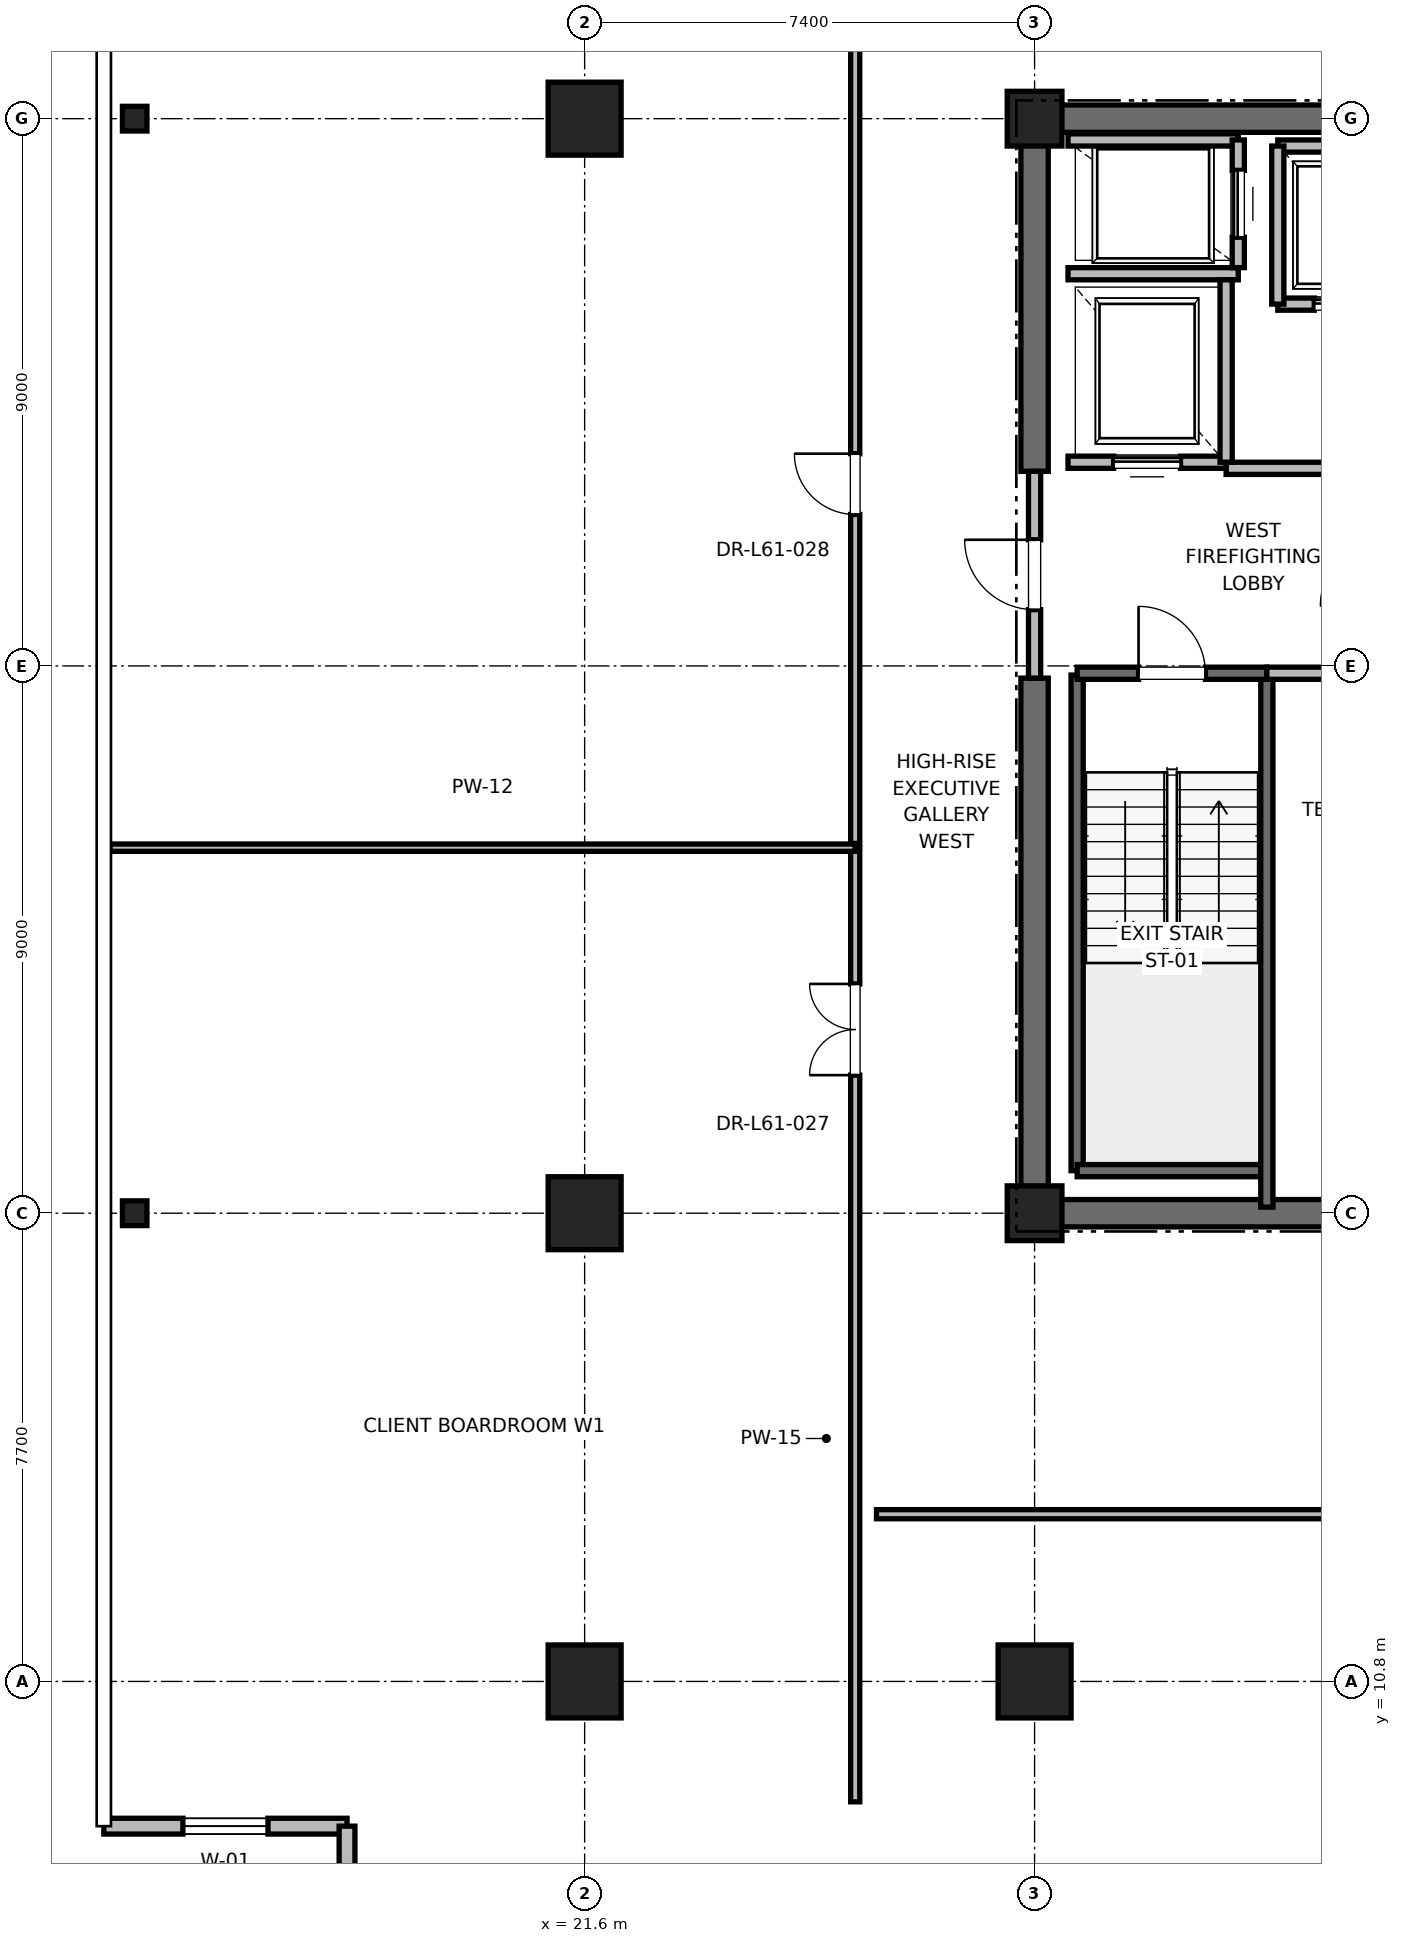
"""IFC4 building model, lengths in metres.
Left out: names, types, materials, properties, quantities, classifications, styles, units other than length and angle.
Written with IfcOpenShell. Run it as: python <this file> out.ifc"""

import sys

from ifc_helpers import new_model, si_unit, direction, frame, frame_2d, origin, origin_2d, place, context, subcontext, project, spatial, rectangle, i_section, extrude, element, fill, save


model = new_model("IFC4")
c1 = context("Model", 3, precision=1e-05, world=origin(), true_north=direction((0.0, 1.0)))
c2 = subcontext(c1, "Body", "Model", "MODEL_VIEW")
j1 = project(units=[si_unit("LENGTHUNIT", "METRE"), si_unit("PLANEANGLEUNIT", "RADIAN")], contexts=[c1])
p1 = place(None, origin())
s1 = spatial("IfcSite", under=j1, at=p1, CompositionType="ELEMENT")
p2 = place(p1, origin())
s2 = spatial("IfcBuilding", under=s1, at=p2, CompositionType="ELEMENT")
p3 = place(p2, frame((0.0, 0.0, 263.2)))
s3 = spatial("IfcBuildingStorey", under=s2, at=p3, CompositionType="ELEMENT", Elevation=263.2)
for number, where, z_axis, x_axis in (
    (1, (29.0, 10.8, 0.0), (0.0, 0.0, 1.0), (1.0, 0.0, 0.0)),
    (2, (21.6, 18.5, 0.0), (0.0, 0.0, 1.0), (1.0, 0.0, 0.0)),
    (3, (21.6, 36.5, 0.0), (0.0, 0.0, 1.0), (1.0, 0.0, 0.0)),
    (4, (21.6, 10.8, 0.0), (0.0, 0.0, 1.0), (1.0, 0.0, 0.0)),
):
    element("IfcColumn", number, at=place(p3, frame(where, z_axis=z_axis, x_axis=x_axis)), inside=s3, PredefinedType="COLUMN", context=c2, shape_type="SweptSolid", body=[
        extrude(rectangle(XDim=1.2, YDim=1.2, at=origin_2d()), origin(), (0.0, 0.0, 1.0), 4.0),
    ])
for number, where, z_axis, x_axis in (
    (5, (14.2, 18.5, 0.0), (0.0, 0.0, 1.0), (1.0, 0.0, 0.0)),
    (6, (14.2, 36.5, 0.0), (0.0, 0.0, 1.0), (1.0, 0.0, 0.0)),
):
    element("IfcColumn", number, at=place(p3, frame(where, z_axis=z_axis, x_axis=x_axis)), inside=s3, PredefinedType="COLUMN", context=c2, shape_type="SweptSolid", body=[
        extrude(i_section(OverallWidth=0.403, OverallDepth=0.406, WebThickness=0.027, FlangeThickness=0.043, FilletRadius=0.015, at=origin_2d()), origin(), (0.0, 0.0, 1.0), 4.0),
    ])
for number, where, z_axis, x_axis in (
    (7, (29.0, 18.5, 0.0), (0.0, 0.0, 1.0), (1.0, 0.0, 0.0)),
    (8, (29.0, 36.5, 0.0), (0.0, 0.0, 1.0), (1.0, 0.0, 0.0)),
):
    element("IfcColumn", number, at=place(p3, frame(where, z_axis=z_axis, x_axis=x_axis)), inside=s3, PredefinedType="PILASTER", context=c2, shape_type="SweptSolid", body=[
        extrude(rectangle(XDim=0.9, YDim=0.9, at=origin_2d()), origin(), (0.0, 0.0, 1.0), 4.0),
    ])
p4 = place(p3, frame((29.0, 18.5, 0.0), z_axis=(0.0, 0.0, 1.0), x_axis=(1.0, 0.0, 0.0)))
e9 = element("IfcWall", 9, at=p4, inside=s3, PredefinedType="SHEAR", context=c2, shape_type="SweptSolid", body=[
    extrude(rectangle(XDim=9.2, YDim=0.45, at=frame_2d((4.6, 0.0))), origin(), (0.0, 0.0, 1.0), 3.785),
])
p5 = place(p3, frame((29.0, 36.5, 0.0), z_axis=(0.0, 0.0, 1.0), x_axis=(1.0, 0.0, 0.0)))
e10 = element("IfcWall", 10, at=p5, inside=s3, PredefinedType="SHEAR", context=c2, shape_type="SweptSolid", body=[
    extrude(rectangle(XDim=5.8, YDim=0.45, at=frame_2d((2.9, 0.0))), origin(), (0.0, 0.0, 1.0), 3.785),
])
p6 = place(p3, frame((29.0, 18.5, 0.0), z_axis=(0.0, 0.0, 1.0), x_axis=(0.0, 1.0, 0.0)))
e11 = element("IfcWall", 11, at=p6, inside=s3, PredefinedType="SHEAR", context=c2, shape_type="SweptSolid", body=[
    extrude(rectangle(XDim=8.8, YDim=0.45, at=frame_2d((4.4, 0.0))), origin(), (0.0, 0.0, 1.0), 3.785),
])
p7 = place(p3, frame((29.0, 30.7, 0.0), z_axis=(0.0, 0.0, 1.0), x_axis=(0.0, 1.0, 0.0)))
e12 = element("IfcWall", 12, at=p7, inside=s3, PredefinedType="SHEAR", context=c2, shape_type="SweptSolid", body=[
    extrude(rectangle(XDim=5.8, YDim=0.45, at=frame_2d((2.9, 0.0))), origin(), (0.0, 0.0, 1.0), 3.785),
])
p8 = place(p3, frame((13.692, 8.42, 0.0), z_axis=(0.0, 0.0, 1.0), x_axis=(1.0, 0.0, 0.0)))
e13 = element("IfcWall", 13, at=p8, inside=s3, PredefinedType="PARAPET", context=c2, shape_type="SweptSolid", body=[
    extrude(rectangle(XDim=4.0, YDim=0.26, at=frame_2d((2.0, 0.0))), origin(), (0.0, 0.0, 1.0), 3.785),
])
p9 = place(p8, frame((1.3, 0.0, 0.85)))
e14 = element("IfcOpeningElement", 14, at=p9, cuts=e13, PredefinedType="OPENING", context=c2, shape_type="SweptSolid", body=[
    extrude(rectangle(XDim=1.4, YDim=2.0, at=frame_2d((0.7, 1.0))), frame((0.0, 0.13, 0.0), z_axis=(0.0, -1.0, 0.0), x_axis=(1.0, 0.0, 0.0)), (0.0, 0.0, 1.0), 0.26),
])
p10 = place(p3, frame((17.692, 8.42, 0.0), z_axis=(0.0, 0.0, 1.0), x_axis=(0.0, -1.0, 0.0)))
e15 = element("IfcWall", 15, at=p10, inside=s3, PredefinedType="PARAPET", context=c2, shape_type="SweptSolid", body=[
    extrude(rectangle(XDim=3.5, YDim=0.26, at=frame_2d((1.75, 0.0))), origin(), (0.0, 0.0, 1.0), 3.785),
])
p11 = place(p3, frame((29.7, 19.2, 0.0), z_axis=(0.0, 0.0, 1.0), x_axis=(0.0, 1.0, 0.0)))
e16 = element("IfcWall", 16, at=p11, inside=s3, PredefinedType="SOLIDWALL", context=c2, shape_type="SweptSolid", body=[
    extrude(rectangle(XDim=8.15, YDim=0.2, at=frame_2d((4.075, 0.0))), origin(), (0.0, 0.0, 1.0), 3.785),
])
p12 = place(p3, frame((29.7, 19.2, 0.0), z_axis=(0.0, 0.0, 1.0), x_axis=(1.0, 0.0, 0.0)))
e17 = element("IfcWall", 17, at=p12, inside=s3, PredefinedType="SOLIDWALL", context=c2, shape_type="SweptSolid", body=[
    extrude(rectangle(XDim=3.12, YDim=0.2, at=frame_2d((1.56, 0.0))), origin(), (0.0, 0.0, 1.0), 3.785),
])
p13 = place(p3, frame((32.82, 18.6, 0.0), z_axis=(0.0, 0.0, 1.0), x_axis=(0.0, 1.0, 0.0)))
e18 = element("IfcWall", 18, at=p13, inside=s3, PredefinedType="SOLIDWALL", context=c2, shape_type="SweptSolid", body=[
    extrude(rectangle(XDim=8.78, YDim=0.2, at=frame_2d((4.39, 0.0))), origin(), (0.0, 0.0, 1.0), 3.785),
])
p14 = place(p3, frame((29.7, 27.38, 0.0), z_axis=(0.0, 0.0, 1.0), x_axis=(1.0, 0.0, 0.0)))
e19 = element("IfcWall", 19, at=p14, inside=s3, PredefinedType="SOLIDWALL", context=c2, shape_type="SweptSolid", body=[
    extrude(rectangle(XDim=3.12, YDim=0.2, at=frame_2d((1.56, 0.0))), origin(), (0.0, 0.0, 1.0), 3.785),
])
p15 = place(p14, frame((1.01, 0.0, 0.0)))
e20 = element("IfcOpeningElement", 20, at=p15, cuts=e19, PredefinedType="OPENING", context=c2, shape_type="SweptSolid", body=[
    extrude(rectangle(XDim=1.1, YDim=2.15, at=frame_2d((0.55, 1.075))), frame((0.0, 0.1, 0.0), z_axis=(0.0, -1.0, 0.0), x_axis=(1.0, 0.0, 0.0)), (0.0, 0.0, 1.0), 0.2),
])
p16 = place(p3, frame((29.0, 27.3, 0.0), z_axis=(0.0, 0.0, 1.0), x_axis=(0.0, 1.0, 0.0)))
e21 = element("IfcWall", 21, at=p16, inside=s3, PredefinedType="PARTITIONING", context=c2, shape_type="SweptSolid", body=[
    extrude(rectangle(XDim=3.4, YDim=0.2, at=frame_2d((1.7, 0.0))), origin(), (0.0, 0.0, 1.0), 2.865),
])
p17 = place(p16, frame((1.125, 0.0, 0.0)))
e22 = element("IfcOpeningElement", 22, at=p17, cuts=e21, PredefinedType="OPENING", context=c2, shape_type="SweptSolid", body=[
    extrude(rectangle(XDim=1.15, YDim=2.2, at=frame_2d((0.575, 1.1))), frame((0.0, 0.1, 0.0), z_axis=(0.0, -1.0, 0.0), x_axis=(1.0, 0.0, 0.0)), (0.0, 0.0, 1.0), 0.2),
])
p18 = place(p3, frame((32.82, 27.38, 0.0), z_axis=(0.0, 0.0, 1.0), x_axis=(1.0, 0.0, 0.0)))
e23 = element("IfcWall", 23, at=p18, inside=s3, PredefinedType="PARTITIONING", context=c2, shape_type="SweptSolid", body=[
    extrude(rectangle(XDim=5.62, YDim=0.2, at=frame_2d((2.81, 0.0))), origin(), (0.0, 0.0, 1.0), 3.785),
])
p19 = place(p3, frame((32.15, 30.75, 0.0), z_axis=(0.0, 0.0, 1.0), x_axis=(1.0, 0.0, 0.0)))
e24 = element("IfcWall", 24, at=p19, inside=s3, PredefinedType="PARTITIONING", context=c2, shape_type="SweptSolid", body=[
    extrude(rectangle(XDim=2.7, YDim=0.2, at=frame_2d((1.35, 0.0))), origin(), (0.0, 0.0, 1.0), 3.785),
])
p20 = place(p3, frame((29.55, 30.85, 0.0), z_axis=(0.0, 0.0, 1.0), x_axis=(1.0, 0.0, 0.0)))
e25 = element("IfcWall", 25, at=p20, inside=s3, PredefinedType="SOLIDWALL", context=c2, shape_type="SweptSolid", body=[
    extrude(rectangle(XDim=2.6, YDim=0.2, at=frame_2d((1.3, 0.0))), origin(), (0.0, 0.0, 1.0), 2.865),
])
p21 = place(p20, frame((0.75, 0.0, 0.0)))
e26 = element("IfcOpeningElement", 26, at=p21, cuts=e25, PredefinedType="OPENING", context=c2, shape_type="SweptSolid", body=[
    extrude(rectangle(XDim=1.1, YDim=2.2, at=frame_2d((0.55, 1.1))), frame((0.0, 0.1, 0.0), z_axis=(0.0, -1.0, 0.0), x_axis=(1.0, 0.0, 0.0)), (0.0, 0.0, 1.0), 0.2),
])
p22 = place(p3, frame((29.55, 33.95, 0.0), z_axis=(0.0, 0.0, 1.0), x_axis=(1.0, 0.0, 0.0)))
e27 = element("IfcWall", 27, at=p22, inside=s3, PredefinedType="SOLIDWALL", context=c2, shape_type="SweptSolid", body=[
    extrude(rectangle(XDim=2.8, YDim=0.2, at=frame_2d((1.4, 0.0))), origin(), (0.0, 0.0, 1.0), 3.785),
])
p23 = place(p3, frame((32.15, 30.85, 0.0), z_axis=(0.0, 0.0, 1.0), x_axis=(0.0, 1.0, 0.0)))
e28 = element("IfcWall", 28, at=p23, inside=s3, PredefinedType="SOLIDWALL", context=c2, shape_type="SweptSolid", body=[
    extrude(rectangle(XDim=3.0, YDim=0.2, at=frame_2d((1.5, 0.0))), origin(), (0.0, 0.0, 1.0), 3.785),
])
p24 = place(p3, frame((32.35, 36.15, 0.0), z_axis=(0.0, 0.0, 1.0), x_axis=(-1.0, 0.0, 0.0)))
e29 = element("IfcWall", 29, at=p24, inside=s3, PredefinedType="SOLIDWALL", context=c2, shape_type="SweptSolid", body=[
    extrude(rectangle(XDim=2.8, YDim=0.2, at=frame_2d((1.4, 0.0))), origin(), (0.0, 0.0, 1.0), 3.148),
])
p25 = place(p3, frame((32.35, 34.05, 0.0), z_axis=(0.0, 0.0, 1.0), x_axis=(0.0, 1.0, 0.0)))
e30 = element("IfcWall", 30, at=p25, inside=s3, PredefinedType="SOLIDWALL", context=c2, shape_type="SweptSolid", body=[
    extrude(rectangle(XDim=2.1, YDim=0.2, at=frame_2d((1.05, 0.0))), origin(), (0.0, 0.0, 1.0), 3.785),
])
p26 = place(p25, frame((0.5, 0.0, 0.0)))
e31 = element("IfcOpeningElement", 31, at=p26, cuts=e30, PredefinedType="OPENING", context=c2, shape_type="SweptSolid", body=[
    extrude(rectangle(XDim=1.1, YDim=2.2, at=frame_2d((0.55, 1.1))), frame((0.0, 0.1, 0.0), z_axis=(0.0, -1.0, 0.0), x_axis=(1.0, 0.0, 0.0)), (0.0, 0.0, 1.0), 0.2),
])
p27 = place(p3, frame((33.0, 33.45, 0.0), z_axis=(0.0, 0.0, 1.0), x_axis=(1.0, 0.0, 0.0)))
e32 = element("IfcWall", 32, at=p27, inside=s3, PredefinedType="SOLIDWALL", context=c2, shape_type="SweptSolid", body=[
    extrude(rectangle(XDim=2.3, YDim=0.2, at=frame_2d((1.15, 0.0))), origin(), (0.0, 0.0, 1.0), 3.785),
])
p28 = place(p27, frame((0.6, 0.0, 0.0)))
e33 = element("IfcOpeningElement", 33, at=p28, cuts=e32, PredefinedType="OPENING", context=c2, shape_type="SweptSolid", body=[
    extrude(rectangle(XDim=1.1, YDim=2.2, at=frame_2d((0.55, 1.1))), frame((0.0, 0.1, 0.0), z_axis=(0.0, -1.0, 0.0), x_axis=(1.0, 0.0, 0.0)), (0.0, 0.0, 1.0), 0.2),
])
p29 = place(p3, frame((35.3, 36.05, 0.0), z_axis=(0.0, 0.0, 1.0), x_axis=(-1.0, 0.0, 0.0)))
e34 = element("IfcWall", 34, at=p29, inside=s3, PredefinedType="SOLIDWALL", context=c2, shape_type="SweptSolid", body=[
    extrude(rectangle(XDim=2.3, YDim=0.2, at=frame_2d((1.15, 0.0))), origin(), (0.0, 0.0, 1.0), 2.865),
])
p30 = place(p3, frame((33.0, 36.05, 0.0), z_axis=(0.0, 0.0, 1.0), x_axis=(0.0, -1.0, 0.0)))
e35 = element("IfcWall", 35, at=p30, inside=s3, PredefinedType="SOLIDWALL", context=c2, shape_type="SweptSolid", body=[
    extrude(rectangle(XDim=2.6, YDim=0.2, at=frame_2d((1.3, 0.0))), origin(), (0.0, 0.0, 1.0), 3.785),
])
p31 = place(p3, frame((26.4, 13.55, 0.0), z_axis=(0.0, 0.0, 1.0), x_axis=(1.0, 0.0, 0.0)))
e36 = element("IfcWall", 36, at=p31, inside=s3, PredefinedType="PARTITIONING", context=c2, shape_type="SweptSolid", body=[
    extrude(rectangle(XDim=27.2, YDim=0.15, at=frame_2d((13.6, 0.0))), origin(), (0.0, 0.0, 1.0), 2.85),
])
p32 = place(p31, frame((13.075, 0.0, 0.0)))
e37 = element("IfcOpeningElement", 37, at=p32, cuts=e36, PredefinedType="OPENING", context=c2, shape_type="SweptSolid", body=[
    extrude(rectangle(XDim=1.05, YDim=2.2, at=frame_2d((0.525, 1.1))), frame((0.0, 0.075, 0.0), z_axis=(0.0, -1.0, 0.0), x_axis=(1.0, 0.0, 0.0)), (0.0, 0.0, 1.0), 0.15),
])
p33 = place(p3, frame((26.05, 8.82, 0.0), z_axis=(0.0, 0.0, 1.0), x_axis=(0.0, 1.0, 0.0)))
e38 = element("IfcWall", 38, at=p33, inside=s3, PredefinedType="PARTITIONING", context=c2, shape_type="SweptSolid", body=[
    extrude(rectangle(XDim=15.691, YDim=0.15, at=frame_2d((7.846, 0.0))), origin(), (0.0, 0.0, 1.0), 2.85),
])
p34 = place(p33, frame((11.951, 0.0, 0.0)))
e39 = element("IfcOpeningElement", 39, at=p34, cuts=e38, PredefinedType="OPENING", context=c2, shape_type="SweptSolid", body=[
    extrude(rectangle(XDim=1.5, YDim=2.25, at=frame_2d((0.75, 1.125))), frame((0.0, 0.075, 0.0), z_axis=(0.0, -1.0, 0.0), x_axis=(1.0, 0.0, 0.0)), (0.0, 0.0, 1.0), 0.15),
])
p35 = place(p3, frame((13.792, 24.511, 0.0), z_axis=(0.0, 0.0, 1.0), x_axis=(1.0, 0.0, 0.0)))
e40 = element("IfcWall", 40, at=p35, inside=s3, PredefinedType="PARTITIONING", context=c2, shape_type="SweptSolid", body=[
    extrude(rectangle(XDim=12.258, YDim=0.12, at=frame_2d((6.129, 0.0))), origin(), (0.0, 0.0, 1.0), 2.85),
])
p36 = place(p3, frame((26.05, 24.581, 0.0), z_axis=(0.0, 0.0, 1.0), x_axis=(0.0, 1.0, 0.0)))
e41 = element("IfcWall", 41, at=p36, inside=s3, PredefinedType="PARTITIONING", context=c2, shape_type="SweptSolid", body=[
    extrude(rectangle(XDim=21.599, YDim=0.15, at=frame_2d((10.799, 0.0))), origin(), (0.0, 0.0, 1.0), 2.85),
])
p37 = place(p36, frame((5.409, 0.0, 0.0)))
e42 = element("IfcOpeningElement", 42, at=p37, cuts=e41, PredefinedType="OPENING", context=c2, shape_type="SweptSolid", body=[
    extrude(rectangle(XDim=1.0, YDim=2.15, at=frame_2d((0.5, 1.075))), frame((0.0, 0.075, 0.0), z_axis=(0.0, -1.0, 0.0), x_axis=(1.0, 0.0, 0.0)), (0.0, 0.0, 1.0), 0.15),
])
p38 = place(p9, origin())
e43 = element("IfcWindow", 43, at=p38, inside=s3, PartitioningType="SINGLE_PANEL", PredefinedType="WINDOW", context=c2, shape_type="SweptSolid", body=[
    extrude(rectangle(XDim=1.4, YDim=2.0, at=frame_2d((0.7, 1.0))), frame((0.0, 0.03, 0.0), z_axis=(0.0, -1.0, 0.0), x_axis=(1.0, 0.0, 0.0)), (0.0, 0.0, 1.0), 0.06),
])
fill(e14, e43)
p39 = place(p15, origin())
e44 = element("IfcDoor", 44, at=p39, inside=s3, OperationType="SINGLE_SWING_LEFT", PredefinedType="DOOR", context=c2, shape_type="SweptSolid", body=[
    extrude(rectangle(XDim=1.1, YDim=2.15, at=frame_2d((0.55, 1.075))), frame((0.0, 0.025, 0.0), z_axis=(0.0, -1.0, 0.0), x_axis=(1.0, 0.0, 0.0)), (0.0, 0.0, 1.0), 0.05),
])
fill(e20, e44)
p40 = place(p17, origin())
e45 = element("IfcDoor", 45, at=p40, inside=s3, OperationType="SINGLE_SWING_RIGHT", PredefinedType="DOOR", context=c2, shape_type="SweptSolid", body=[
    extrude(rectangle(XDim=1.15, YDim=2.2, at=frame_2d((0.575, 1.1))), frame((0.0, 0.025, 0.0), z_axis=(0.0, -1.0, 0.0), x_axis=(1.0, 0.0, 0.0)), (0.0, 0.0, 1.0), 0.05),
])
fill(e22, e45)
p41 = place(p21, origin())
e46 = element("IfcDoor", 46, at=p41, inside=s3, OperationType="SLIDING_TO_RIGHT", PredefinedType="DOOR", context=c2, shape_type="SweptSolid", body=[
    extrude(rectangle(XDim=1.1, YDim=2.2, at=frame_2d((0.55, 1.1))), frame((0.0, 0.025, 0.0), z_axis=(0.0, -1.0, 0.0), x_axis=(1.0, 0.0, 0.0)), (0.0, 0.0, 1.0), 0.05),
])
fill(e26, e46)
p42 = place(p26, origin())
e47 = element("IfcDoor", 47, at=p42, inside=s3, OperationType="SLIDING_TO_RIGHT", PredefinedType="DOOR", context=c2, shape_type="SweptSolid", body=[
    extrude(rectangle(XDim=1.1, YDim=2.2, at=frame_2d((0.55, 1.1))), frame((0.0, 0.025, 0.0), z_axis=(0.0, -1.0, 0.0), x_axis=(1.0, 0.0, 0.0)), (0.0, 0.0, 1.0), 0.05),
])
fill(e31, e47)
p43 = place(p28, origin())
e48 = element("IfcDoor", 48, at=p43, inside=s3, OperationType="SLIDING_TO_RIGHT", PredefinedType="DOOR", context=c2, shape_type="SweptSolid", body=[
    extrude(rectangle(XDim=1.1, YDim=2.2, at=frame_2d((0.55, 1.1))), frame((0.0, 0.025, 0.0), z_axis=(0.0, -1.0, 0.0), x_axis=(1.0, 0.0, 0.0)), (0.0, 0.0, 1.0), 0.05),
])
fill(e33, e48)
p44 = place(p34, origin())
e49 = element("IfcDoor", 49, at=p44, inside=s3, OperationType="DOUBLE_DOOR_SINGLE_SWING", PredefinedType="DOOR", context=c2, shape_type="SweptSolid", body=[
    extrude(rectangle(XDim=1.5, YDim=2.25, at=frame_2d((0.75, 1.125))), frame((0.0, 0.025, 0.0), z_axis=(0.0, -1.0, 0.0), x_axis=(1.0, 0.0, 0.0)), (0.0, 0.0, 1.0), 0.05),
])
fill(e39, e49)
p45 = place(p37, origin())
e50 = element("IfcDoor", 50, at=p45, inside=s3, OperationType="SINGLE_SWING_RIGHT", PredefinedType="DOOR", context=c2, shape_type="SweptSolid", body=[
    extrude(rectangle(XDim=1.0, YDim=2.15, at=frame_2d((0.5, 1.075))), frame((0.0, 0.025, 0.0), z_axis=(0.0, -1.0, 0.0), x_axis=(1.0, 0.0, 0.0)), (0.0, 0.0, 1.0), 0.05),
])
fill(e42, e50)
save(model, sys.argv[1])
